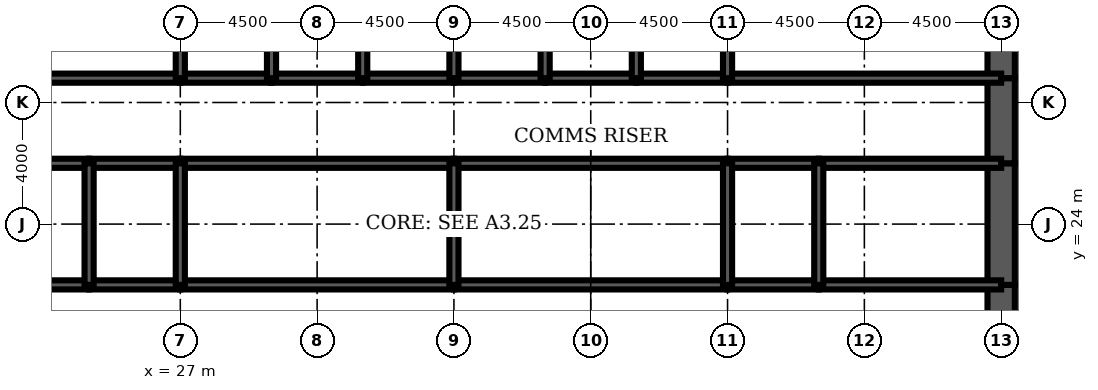
"""IFC4 building model, lengths in metres.
Left out: names, types, materials, properties, quantities, classifications, styles, units other than length and angle.
Written with IfcOpenShell. Run it as: python <this file> out.ifc"""

import sys

from ifc_helpers import new_model, si_unit, direction, frame, frame_2d, origin, place, context, subcontext, project, spatial, rectangle, extrude, element, fill, save


model = new_model("IFC4")
c1 = context("Model", 3, precision=1e-05, world=origin(), true_north=direction((0.0, 1.0)))
c2 = subcontext(c1, "Body", "Model", "MODEL_VIEW")
j1 = project(units=[si_unit("LENGTHUNIT", "METRE"), si_unit("PLANEANGLEUNIT", "RADIAN")], contexts=[c1])
p1 = place(None, origin())
s1 = spatial("IfcSite", under=j1, at=p1, CompositionType="ELEMENT")
p2 = place(p1, origin())
s2 = spatial("IfcBuilding", under=s1, at=p2, CompositionType="ELEMENT")
p3 = place(p2, frame((0.0, 0.0, 108.9)))
s3 = spatial("IfcBuildingStorey", under=s2, at=p3, CompositionType="ELEMENT", Elevation=108.9)
p4 = place(p3, frame((54.0, 19.2, 0.0), z_axis=(0.0, 0.0, 1.0), x_axis=(0.0, 1.0, 0.0)))
e1 = element("IfcWall", 1, at=p4, inside=s3, PredefinedType="SHEAR", context=c2, shape_type="SweptSolid", body=[
    extrude(rectangle(XDim=2.8, YDim=0.9, at=frame_2d((1.4, 0.0))), origin(), (0.0, 0.0, 1.0), 4.2),
])
p5 = place(p4, frame((0.4, 0.0, 0.0)))
e2 = element("IfcOpeningElement", 2, at=p5, cuts=e1, PredefinedType="OPENING", context=c2, shape_type="SweptSolid", body=[
    extrude(rectangle(XDim=1.8, YDim=2.1, at=frame_2d((0.9, 1.05))), frame((0.0, 0.46, 0.0), z_axis=(0.0, -1.0, 0.0), x_axis=(1.0, 0.0, 0.0)), (0.0, 0.0, 1.0), 0.92),
])
p6 = place(p3, frame((54.0, 22.0, 0.0), z_axis=(0.0, 0.0, 1.0), x_axis=(0.0, 1.0, 0.0)))
e3 = element("IfcWall", 3, at=p6, inside=s3, PredefinedType="SHEAR", context=c2, shape_type="SweptSolid", body=[
    extrude(rectangle(XDim=4.0, YDim=0.9, at=frame_2d((2.0, 0.0))), origin(), (0.0, 0.0, 1.0), 4.2),
])
p7 = place(p3, frame((54.0, 26.0, 0.0), z_axis=(0.0, 0.0, 1.0), x_axis=(0.0, 1.0, 0.0)))
e4 = element("IfcWall", 4, at=p7, inside=s3, PredefinedType="SHEAR", context=c2, shape_type="SweptSolid", body=[
    extrude(rectangle(XDim=2.8, YDim=0.9, at=frame_2d((1.4, 0.0))), origin(), (0.0, 0.0, 1.0), 4.2),
])
p8 = place(p7, frame((0.6, 0.0, 0.0)))
e5 = element("IfcOpeningElement", 5, at=p8, cuts=e4, PredefinedType="OPENING", context=c2, shape_type="SweptSolid", body=[
    extrude(rectangle(XDim=1.8, YDim=2.1, at=frame_2d((0.9, 1.05))), frame((0.0, 0.46, 0.0), z_axis=(0.0, -1.0, 0.0), x_axis=(1.0, 0.0, 0.0)), (0.0, 0.0, 1.0), 0.92),
])
p9 = place(p3, frame((54.0, 28.8, 0.0), z_axis=(0.0, 0.0, 1.0), x_axis=(0.0, 1.0, 0.0)))
e6 = element("IfcWall", 6, at=p9, inside=s3, PredefinedType="SHEAR", context=c2, shape_type="SweptSolid", body=[
    extrude(rectangle(XDim=3.2, YDim=0.9, at=frame_2d((1.6, 0.0))), origin(), (0.0, 0.0, 1.0), 4.2),
])
p10 = place(p3, frame((18.0, 28.8, 0.0), z_axis=(0.0, 0.0, 1.0), x_axis=(1.0, 0.0, 0.0)))
e7 = element("IfcWall", 7, at=p10, inside=s3, PredefinedType="SOLIDWALL", context=c2, shape_type="SweptSolid", body=[
    extrude(rectangle(XDim=9.0, YDim=0.3, at=frame_2d((4.5, 0.0))), origin(), (0.0, 0.0, 1.0), 4.2),
])
p11 = place(p10, frame((0.65, 0.0, 0.0)))
e8 = element("IfcOpeningElement", 8, at=p11, cuts=e7, PredefinedType="OPENING", context=c2, shape_type="SweptSolid", body=[
    extrude(rectangle(XDim=1.0, YDim=2.1, at=frame_2d((0.5, 1.05))), frame((0.0, 0.16, 0.0), z_axis=(0.0, -1.0, 0.0), x_axis=(1.0, 0.0, 0.0)), (0.0, 0.0, 1.0), 0.32),
])
p12 = place(p3, frame((27.0, 28.8, 0.0), z_axis=(0.0, 0.0, 1.0), x_axis=(1.0, 0.0, 0.0)))
e9 = element("IfcWall", 9, at=p12, inside=s3, PredefinedType="SOLIDWALL", context=c2, shape_type="SweptSolid", body=[
    extrude(rectangle(XDim=3.0, YDim=0.3, at=frame_2d((1.5, 0.0))), origin(), (0.0, 0.0, 1.0), 4.2),
])
p13 = place(p12, frame((0.95, 0.0, 0.0)))
e10 = element("IfcOpeningElement", 10, at=p13, cuts=e9, PredefinedType="OPENING", context=c2, shape_type="SweptSolid", body=[
    extrude(rectangle(XDim=1.1, YDim=2.2, at=frame_2d((0.55, 1.1))), frame((0.0, 0.16, 0.0), z_axis=(0.0, -1.0, 0.0), x_axis=(1.0, 0.0, 0.0)), (0.0, 0.0, 1.0), 0.32),
])
p14 = place(p3, frame((30.0, 28.8, 0.0), z_axis=(0.0, 0.0, 1.0), x_axis=(1.0, 0.0, 0.0)))
e11 = element("IfcWall", 11, at=p14, inside=s3, PredefinedType="SOLIDWALL", context=c2, shape_type="SweptSolid", body=[
    extrude(rectangle(XDim=3.0, YDim=0.3, at=frame_2d((1.5, 0.0))), origin(), (0.0, 0.0, 1.0), 4.2),
])
p15 = place(p14, frame((0.95, 0.0, 0.0)))
e12 = element("IfcOpeningElement", 12, at=p15, cuts=e11, PredefinedType="OPENING", context=c2, shape_type="SweptSolid", body=[
    extrude(rectangle(XDim=1.1, YDim=2.2, at=frame_2d((0.55, 1.1))), frame((0.0, 0.16, 0.0), z_axis=(0.0, -1.0, 0.0), x_axis=(1.0, 0.0, 0.0)), (0.0, 0.0, 1.0), 0.32),
])
p16 = place(p3, frame((33.0, 28.8, 0.0), z_axis=(0.0, 0.0, 1.0), x_axis=(1.0, 0.0, 0.0)))
e13 = element("IfcWall", 13, at=p16, inside=s3, PredefinedType="SOLIDWALL", context=c2, shape_type="SweptSolid", body=[
    extrude(rectangle(XDim=3.0, YDim=0.3, at=frame_2d((1.5, 0.0))), origin(), (0.0, 0.0, 1.0), 4.2),
])
p17 = place(p16, frame((0.95, 0.0, 0.0)))
e14 = element("IfcOpeningElement", 14, at=p17, cuts=e13, PredefinedType="OPENING", context=c2, shape_type="SweptSolid", body=[
    extrude(rectangle(XDim=1.1, YDim=2.2, at=frame_2d((0.55, 1.1))), frame((0.0, 0.16, 0.0), z_axis=(0.0, -1.0, 0.0), x_axis=(1.0, 0.0, 0.0)), (0.0, 0.0, 1.0), 0.32),
])
for number, where, z_axis, x_axis in (
    (15, (36.0, 28.8, 0.0), (0.0, 0.0, 1.0), (1.0, 0.0, 0.0)),
    (16, (39.0, 28.8, 0.0), (0.0, 0.0, 1.0), (1.0, 0.0, 0.0)),
):
    element("IfcWall", number, at=place(p3, frame(where, z_axis=z_axis, x_axis=x_axis)), inside=s3, PredefinedType="SOLIDWALL", context=c2, shape_type="SweptSolid", body=[
        extrude(rectangle(XDim=3.0, YDim=0.3, at=frame_2d((1.5, 0.0))), origin(), (0.0, 0.0, 1.0), 4.2),
    ])
p18 = place(p3, frame((42.0, 28.8, 0.0), z_axis=(0.0, 0.0, 1.0), x_axis=(1.0, 0.0, 0.0)))
e17 = element("IfcWall", 17, at=p18, inside=s3, PredefinedType="SOLIDWALL", context=c2, shape_type="SweptSolid", body=[
    extrude(rectangle(XDim=3.0, YDim=0.3, at=frame_2d((1.5, 0.0))), origin(), (0.0, 0.0, 1.0), 4.2),
])
p19 = place(p18, frame((0.95, 0.0, 0.0)))
e18 = element("IfcOpeningElement", 18, at=p19, cuts=e17, PredefinedType="OPENING", context=c2, shape_type="SweptSolid", body=[
    extrude(rectangle(XDim=1.1, YDim=2.2, at=frame_2d((0.55, 1.1))), frame((0.0, 0.16, 0.0), z_axis=(0.0, -1.0, 0.0), x_axis=(1.0, 0.0, 0.0)), (0.0, 0.0, 1.0), 0.32),
])
p20 = place(p3, frame((45.0, 28.8, 0.0), z_axis=(0.0, 0.0, 1.0), x_axis=(1.0, 0.0, 0.0)))
e19 = element("IfcWall", 19, at=p20, inside=s3, PredefinedType="SOLIDWALL", context=c2, shape_type="SweptSolid", body=[
    extrude(rectangle(XDim=9.0, YDim=0.3, at=frame_2d((4.5, 0.0))), origin(), (0.0, 0.0, 1.0), 4.2),
])
p21 = place(p20, frame((7.35, 0.0, 0.0)))
e20 = element("IfcOpeningElement", 20, at=p21, cuts=e19, PredefinedType="OPENING", context=c2, shape_type="SweptSolid", body=[
    extrude(rectangle(XDim=1.0, YDim=2.1, at=frame_2d((0.5, 1.05))), frame((0.0, 0.16, 0.0), z_axis=(0.0, -1.0, 0.0), x_axis=(1.0, 0.0, 0.0)), (0.0, 0.0, 1.0), 0.32),
])
p22 = place(p3, frame((18.0, 22.0, 0.0), z_axis=(0.0, 0.0, 1.0), x_axis=(1.0, 0.0, 0.0)))
e21 = element("IfcWall", 21, at=p22, inside=s3, PredefinedType="SOLIDWALL", context=c2, shape_type="SweptSolid", body=[
    extrude(rectangle(XDim=6.0, YDim=0.3, at=frame_2d((3.0, 0.0))), origin(), (0.0, 0.0, 1.0), 4.2),
])
p23 = place(p22, frame((4.4, 0.0, 0.0)))
e22 = element("IfcOpeningElement", 22, at=p23, cuts=e21, PredefinedType="OPENING", context=c2, shape_type="SweptSolid", body=[
    extrude(rectangle(XDim=1.0, YDim=2.1, at=frame_2d((0.5, 1.05))), frame((0.0, 0.16, 0.0), z_axis=(0.0, -1.0, 0.0), x_axis=(1.0, 0.0, 0.0)), (0.0, 0.0, 1.0), 0.32),
])
p24 = place(p22, frame((0.85, 0.0, 0.0)))
e23 = element("IfcOpeningElement", 23, at=p24, cuts=e21, PredefinedType="OPENING", context=c2, shape_type="SweptSolid", body=[
    extrude(rectangle(XDim=1.0, YDim=2.1, at=frame_2d((0.5, 1.05))), frame((0.0, 0.16, 0.0), z_axis=(0.0, -1.0, 0.0), x_axis=(1.0, 0.0, 0.0)), (0.0, 0.0, 1.0), 0.32),
])
p25 = place(p3, frame((24.0, 22.0, 0.0), z_axis=(0.0, 0.0, 1.0), x_axis=(1.0, 0.0, 0.0)))
e24 = element("IfcWall", 24, at=p25, inside=s3, PredefinedType="SOLIDWALL", context=c2, shape_type="SweptSolid", body=[
    extrude(rectangle(XDim=3.0, YDim=0.3, at=frame_2d((1.5, 0.0))), origin(), (0.0, 0.0, 1.0), 4.2),
])
p26 = place(p25, frame((1.0, 0.0, 0.0)))
e25 = element("IfcOpeningElement", 25, at=p26, cuts=e24, PredefinedType="OPENING", context=c2, shape_type="SweptSolid", body=[
    extrude(rectangle(XDim=1.0, YDim=2.1, at=frame_2d((0.5, 1.05))), frame((0.0, 0.16, 0.0), z_axis=(0.0, -1.0, 0.0), x_axis=(1.0, 0.0, 0.0)), (0.0, 0.0, 1.0), 0.32),
])
p27 = place(p3, frame((27.0, 22.0, 0.0), z_axis=(0.0, 0.0, 1.0), x_axis=(1.0, 0.0, 0.0)))
e26 = element("IfcWall", 26, at=p27, inside=s3, PredefinedType="SOLIDWALL", context=c2, shape_type="SweptSolid", body=[
    extrude(rectangle(XDim=9.0, YDim=0.3, at=frame_2d((4.5, 0.0))), origin(), (0.0, 0.0, 1.0), 4.2),
])
p28 = place(p27, frame((4.0, 0.0, 0.0)))
e27 = element("IfcOpeningElement", 27, at=p28, cuts=e26, PredefinedType="OPENING", context=c2, shape_type="SweptSolid", body=[
    extrude(rectangle(XDim=1.0, YDim=2.1, at=frame_2d((0.5, 1.05))), frame((0.0, 0.16, 0.0), z_axis=(0.0, -1.0, 0.0), x_axis=(1.0, 0.0, 0.0)), (0.0, 0.0, 1.0), 0.32),
])
p29 = place(p3, frame((36.0, 22.0, 0.0), z_axis=(0.0, 0.0, 1.0), x_axis=(1.0, 0.0, 0.0)))
e28 = element("IfcWall", 28, at=p29, inside=s3, PredefinedType="SOLIDWALL", context=c2, shape_type="SweptSolid", body=[
    extrude(rectangle(XDim=9.0, YDim=0.3, at=frame_2d((4.5, 0.0))), origin(), (0.0, 0.0, 1.0), 4.2),
])
p30 = place(p29, frame((4.0, 0.0, 0.0)))
e29 = element("IfcOpeningElement", 29, at=p30, cuts=e28, PredefinedType="OPENING", context=c2, shape_type="SweptSolid", body=[
    extrude(rectangle(XDim=1.0, YDim=2.1, at=frame_2d((0.5, 1.05))), frame((0.0, 0.16, 0.0), z_axis=(0.0, -1.0, 0.0), x_axis=(1.0, 0.0, 0.0)), (0.0, 0.0, 1.0), 0.32),
])
p31 = place(p3, frame((45.0, 22.0, 0.0), z_axis=(0.0, 0.0, 1.0), x_axis=(1.0, 0.0, 0.0)))
e30 = element("IfcWall", 30, at=p31, inside=s3, PredefinedType="SOLIDWALL", context=c2, shape_type="SweptSolid", body=[
    extrude(rectangle(XDim=3.0, YDim=0.3, at=frame_2d((1.5, 0.0))), origin(), (0.0, 0.0, 1.0), 4.2),
])
p32 = place(p31, frame((1.0, 0.0, 0.0)))
e31 = element("IfcOpeningElement", 31, at=p32, cuts=e30, PredefinedType="OPENING", context=c2, shape_type="SweptSolid", body=[
    extrude(rectangle(XDim=1.0, YDim=2.1, at=frame_2d((0.5, 1.05))), frame((0.0, 0.16, 0.0), z_axis=(0.0, -1.0, 0.0), x_axis=(1.0, 0.0, 0.0)), (0.0, 0.0, 1.0), 0.32),
])
p33 = place(p3, frame((48.0, 22.0, 0.0), z_axis=(0.0, 0.0, 1.0), x_axis=(1.0, 0.0, 0.0)))
e32 = element("IfcWall", 32, at=p33, inside=s3, PredefinedType="SOLIDWALL", context=c2, shape_type="SweptSolid", body=[
    extrude(rectangle(XDim=6.0, YDim=0.3, at=frame_2d((3.0, 0.0))), origin(), (0.0, 0.0, 1.0), 4.2),
])
p34 = place(p33, frame((2.0, 0.0, 0.0)))
e33 = element("IfcOpeningElement", 33, at=p34, cuts=e32, PredefinedType="OPENING", context=c2, shape_type="SweptSolid", body=[
    extrude(rectangle(XDim=1.0, YDim=2.1, at=frame_2d((0.5, 1.05))), frame((0.0, 0.16, 0.0), z_axis=(0.0, -1.0, 0.0), x_axis=(1.0, 0.0, 0.0)), (0.0, 0.0, 1.0), 0.32),
])
p35 = place(p33, frame((4.15, 0.0, 0.0)))
e34 = element("IfcOpeningElement", 34, at=p35, cuts=e32, PredefinedType="OPENING", context=c2, shape_type="SweptSolid", body=[
    extrude(rectangle(XDim=1.0, YDim=2.1, at=frame_2d((0.5, 1.05))), frame((0.0, 0.16, 0.0), z_axis=(0.0, -1.0, 0.0), x_axis=(1.0, 0.0, 0.0)), (0.0, 0.0, 1.0), 0.32),
])
p36 = place(p3, frame((18.0, 26.0, 0.0), z_axis=(0.0, 0.0, 1.0), x_axis=(1.0, 0.0, 0.0)))
e35 = element("IfcWall", 35, at=p36, inside=s3, PredefinedType="SOLIDWALL", context=c2, shape_type="SweptSolid", body=[
    extrude(rectangle(XDim=6.0, YDim=0.3, at=frame_2d((3.0, 0.0))), origin(), (0.0, 0.0, 1.0), 4.2),
])
p37 = place(p3, frame((24.0, 26.0, 0.0), z_axis=(0.0, 0.0, 1.0), x_axis=(1.0, 0.0, 0.0)))
e36 = element("IfcWall", 36, at=p37, inside=s3, PredefinedType="SOLIDWALL", context=c2, shape_type="SweptSolid", body=[
    extrude(rectangle(XDim=3.0, YDim=0.3, at=frame_2d((1.5, 0.0))), origin(), (0.0, 0.0, 1.0), 4.2),
])
for number, where, z_axis, x_axis in (
    (37, (27.0, 26.0, 0.0), (0.0, 0.0, 1.0), (1.0, 0.0, 0.0)),
    (38, (36.0, 26.0, 0.0), (0.0, 0.0, 1.0), (1.0, 0.0, 0.0)),
):
    element("IfcWall", number, at=place(p3, frame(where, z_axis=z_axis, x_axis=x_axis)), inside=s3, PredefinedType="SOLIDWALL", context=c2, shape_type="SweptSolid", body=[
        extrude(rectangle(XDim=9.0, YDim=0.3, at=frame_2d((4.5, 0.0))), origin(), (0.0, 0.0, 1.0), 4.2),
    ])
p38 = place(p3, frame((45.0, 26.0, 0.0), z_axis=(0.0, 0.0, 1.0), x_axis=(1.0, 0.0, 0.0)))
e39 = element("IfcWall", 39, at=p38, inside=s3, PredefinedType="SOLIDWALL", context=c2, shape_type="SweptSolid", body=[
    extrude(rectangle(XDim=3.0, YDim=0.3, at=frame_2d((1.5, 0.0))), origin(), (0.0, 0.0, 1.0), 4.2),
])
p39 = place(p3, frame((48.0, 26.0, 0.0), z_axis=(0.0, 0.0, 1.0), x_axis=(1.0, 0.0, 0.0)))
e40 = element("IfcWall", 40, at=p39, inside=s3, PredefinedType="SOLIDWALL", context=c2, shape_type="SweptSolid", body=[
    extrude(rectangle(XDim=6.0, YDim=0.3, at=frame_2d((3.0, 0.0))), origin(), (0.0, 0.0, 1.0), 4.2),
])
for number, where, z_axis, x_axis in (
    (41, (27.0, 28.8, 0.0), (0.0, 0.0, 1.0), (0.0, 1.0, 0.0)),
    (42, (30.0, 28.8, 0.0), (0.0, 0.0, 1.0), (0.0, 1.0, 0.0)),
    (43, (33.0, 28.8, 0.0), (0.0, 0.0, 1.0), (0.0, 1.0, 0.0)),
    (44, (36.0, 28.8, 0.0), (0.0, 0.0, 1.0), (0.0, 1.0, 0.0)),
    (45, (39.0, 28.8, 0.0), (0.0, 0.0, 1.0), (0.0, 1.0, 0.0)),
    (46, (42.0, 28.8, 0.0), (0.0, 0.0, 1.0), (0.0, 1.0, 0.0)),
    (47, (45.0, 28.8, 0.0), (0.0, 0.0, 1.0), (0.0, 1.0, 0.0)),
):
    element("IfcWall", number, at=place(p3, frame(where, z_axis=z_axis, x_axis=x_axis)), inside=s3, PredefinedType="SOLIDWALL", context=c2, shape_type="SweptSolid", body=[
        extrude(rectangle(XDim=3.2, YDim=0.3, at=frame_2d((1.6, 0.0))), origin(), (0.0, 0.0, 1.0), 4.2),
    ])
for number, where, z_axis, x_axis in (
    (48, (24.0, 22.0, 0.0), (0.0, 0.0, 1.0), (0.0, 1.0, 0.0)),
    (49, (27.0, 22.0, 0.0), (0.0, 0.0, 1.0), (0.0, 1.0, 0.0)),
    (50, (36.0, 22.0, 0.0), (0.0, 0.0, 1.0), (0.0, 1.0, 0.0)),
    (51, (45.0, 22.0, 0.0), (0.0, 0.0, 1.0), (0.0, 1.0, 0.0)),
    (52, (48.0, 22.0, 0.0), (0.0, 0.0, 1.0), (0.0, 1.0, 0.0)),
):
    element("IfcWall", number, at=place(p3, frame(where, z_axis=z_axis, x_axis=x_axis)), inside=s3, PredefinedType="SOLIDWALL", context=c2, shape_type="SweptSolid", body=[
        extrude(rectangle(XDim=4.0, YDim=0.3, at=frame_2d((2.0, 0.0))), origin(), (0.0, 0.0, 1.0), 4.2),
    ])
p40 = place(p3, frame((51.675, 22.15, 0.0), z_axis=(0.0, 0.0, 1.0), x_axis=(0.0, 1.0, 0.0)))
e53 = element("IfcWall", 53, at=p40, inside=s3, PredefinedType="PARTITIONING", context=c2, shape_type="SweptSolid", body=[
    extrude(rectangle(XDim=3.7, YDim=0.15, at=frame_2d((1.85, 0.0))), origin(), (0.0, 0.0, 1.0), 3.0),
])
p41 = place(p3, frame((23.7, 26.15, 0.0), z_axis=(0.0, 0.0, 1.0), x_axis=(0.0, 1.0, 0.0)))
e54 = element("IfcWall", 54, at=p41, inside=s3, PredefinedType="PARTITIONING", context=c2, shape_type="SweptSolid", body=[
    extrude(rectangle(XDim=2.5, YDim=0.15, at=frame_2d((1.25, 0.0))), origin(), (0.0, 0.0, 1.0), 3.0),
])
p42 = place(p41, frame((0.35, 0.0, 0.0)))
e55 = element("IfcOpeningElement", 55, at=p42, cuts=e54, PredefinedType="OPENING", context=c2, shape_type="SweptSolid", body=[
    extrude(rectangle(XDim=1.0, YDim=2.1, at=frame_2d((0.5, 1.05))), frame((0.0, 0.085, 0.0), z_axis=(0.0, -1.0, 0.0), x_axis=(1.0, 0.0, 0.0)), (0.0, 0.0, 1.0), 0.17),
])
p43 = place(p42, origin())
e56 = element("IfcDoor", 56, at=p43, inside=s3, OperationType="SINGLE_SWING_LEFT", PredefinedType="DOOR", context=c2, shape_type="SweptSolid", body=[
    extrude(rectangle(XDim=1.0, YDim=2.1, at=frame_2d((0.5, 1.05))), frame((0.0, 0.025, 0.0), z_axis=(0.0, -1.0, 0.0), x_axis=(1.0, 0.0, 0.0)), (0.0, 0.0, 1.0), 0.05),
])
fill(e55, e56)
p44 = place(p19, origin())
e57 = element("IfcDoor", 57, at=p44, inside=s3, OperationType="DOUBLE_DOOR_SLIDING", PredefinedType="USERDEFINED", context=c2, shape_type="SweptSolid", body=[
    extrude(rectangle(XDim=1.1, YDim=2.2, at=frame_2d((0.55, 1.1))), frame((0.0, 0.025, 0.0), z_axis=(0.0, -1.0, 0.0), x_axis=(1.0, 0.0, 0.0)), (0.0, 0.0, 1.0), 0.05),
])
fill(e18, e57)
p45 = place(p13, origin())
e58 = element("IfcDoor", 58, at=p45, inside=s3, OperationType="DOUBLE_DOOR_SLIDING", PredefinedType="USERDEFINED", context=c2, shape_type="SweptSolid", body=[
    extrude(rectangle(XDim=1.1, YDim=2.2, at=frame_2d((0.55, 1.1))), frame((0.0, 0.025, 0.0), z_axis=(0.0, -1.0, 0.0), x_axis=(1.0, 0.0, 0.0)), (0.0, 0.0, 1.0), 0.05),
])
fill(e10, e58)
p46 = place(p15, origin())
e59 = element("IfcDoor", 59, at=p46, inside=s3, OperationType="DOUBLE_DOOR_SLIDING", PredefinedType="USERDEFINED", context=c2, shape_type="SweptSolid", body=[
    extrude(rectangle(XDim=1.1, YDim=2.2, at=frame_2d((0.55, 1.1))), frame((0.0, 0.025, 0.0), z_axis=(0.0, -1.0, 0.0), x_axis=(1.0, 0.0, 0.0)), (0.0, 0.0, 1.0), 0.05),
])
fill(e12, e59)
p47 = place(p17, origin())
e60 = element("IfcDoor", 60, at=p47, inside=s3, OperationType="DOUBLE_DOOR_SLIDING", PredefinedType="USERDEFINED", context=c2, shape_type="SweptSolid", body=[
    extrude(rectangle(XDim=1.1, YDim=2.2, at=frame_2d((0.55, 1.1))), frame((0.0, 0.025, 0.0), z_axis=(0.0, -1.0, 0.0), x_axis=(1.0, 0.0, 0.0)), (0.0, 0.0, 1.0), 0.05),
])
fill(e14, e60)
p48 = place(p21, origin())
e61 = element("IfcDoor", 61, at=p48, inside=s3, OperationType="SINGLE_SWING_RIGHT", PredefinedType="DOOR", context=c2, shape_type="SweptSolid", body=[
    extrude(rectangle(XDim=1.0, YDim=2.1, at=frame_2d((0.5, 1.05))), frame((0.0, 0.025, 0.0), z_axis=(0.0, -1.0, 0.0), x_axis=(1.0, 0.0, 0.0)), (0.0, 0.0, 1.0), 0.05),
])
fill(e20, e61)
p49 = place(p5, origin())
e62 = element("IfcDoor", 62, at=p49, inside=s3, OperationType="SINGLE_SWING_LEFT", PredefinedType="DOOR", context=c2, shape_type="SweptSolid", body=[
    extrude(rectangle(XDim=1.8, YDim=2.1, at=frame_2d((0.9, 1.05))), frame((0.0, 0.45, 0.0), z_axis=(0.0, -1.0, 0.0), x_axis=(1.0, 0.0, 0.0)), (0.0, 0.0, 1.0), 0.899),
])
fill(e2, e62)
p50 = place(p8, origin())
e63 = element("IfcDoor", 63, at=p50, inside=s3, OperationType="SINGLE_SWING_LEFT", PredefinedType="DOOR", context=c2, shape_type="SweptSolid", body=[
    extrude(rectangle(XDim=1.8, YDim=2.1, at=frame_2d((0.9, 1.05))), frame((0.0, 0.45, 0.0), z_axis=(0.0, -1.0, 0.0), x_axis=(1.0, 0.0, 0.0)), (0.0, 0.0, 1.0), 0.899),
])
fill(e5, e63)
p51 = place(p23, origin())
e64 = element("IfcDoor", 64, at=p51, inside=s3, OperationType="SINGLE_SWING_RIGHT", PredefinedType="DOOR", context=c2, shape_type="SweptSolid", body=[
    extrude(rectangle(XDim=1.0, YDim=2.1, at=frame_2d((0.5, 1.05))), frame((0.0, 0.025, 0.0), z_axis=(0.0, -1.0, 0.0), x_axis=(1.0, 0.0, 0.0)), (0.0, 0.0, 1.0), 0.05),
])
fill(e22, e64)
p52 = place(p26, origin())
e65 = element("IfcDoor", 65, at=p52, inside=s3, OperationType="SINGLE_SWING_LEFT", PredefinedType="DOOR", context=c2, shape_type="SweptSolid", body=[
    extrude(rectangle(XDim=1.0, YDim=2.1, at=frame_2d((0.5, 1.05))), frame((0.0, 0.025, 0.0), z_axis=(0.0, -1.0, 0.0), x_axis=(1.0, 0.0, 0.0)), (0.0, 0.0, 1.0), 0.05),
])
fill(e25, e65)
p53 = place(p28, origin())
e66 = element("IfcDoor", 66, at=p53, inside=s3, OperationType="SINGLE_SWING_LEFT", PredefinedType="DOOR", context=c2, shape_type="SweptSolid", body=[
    extrude(rectangle(XDim=1.0, YDim=2.1, at=frame_2d((0.5, 1.05))), frame((0.0, 0.025, 0.0), z_axis=(0.0, -1.0, 0.0), x_axis=(1.0, 0.0, 0.0)), (0.0, 0.0, 1.0), 0.05),
])
fill(e27, e66)
p54 = place(p30, origin())
e67 = element("IfcDoor", 67, at=p54, inside=s3, OperationType="SINGLE_SWING_LEFT", PredefinedType="DOOR", context=c2, shape_type="SweptSolid", body=[
    extrude(rectangle(XDim=1.0, YDim=2.1, at=frame_2d((0.5, 1.05))), frame((0.0, 0.025, 0.0), z_axis=(0.0, -1.0, 0.0), x_axis=(1.0, 0.0, 0.0)), (0.0, 0.0, 1.0), 0.05),
])
fill(e29, e67)
p55 = place(p32, origin())
e68 = element("IfcDoor", 68, at=p55, inside=s3, OperationType="SINGLE_SWING_LEFT", PredefinedType="DOOR", context=c2, shape_type="SweptSolid", body=[
    extrude(rectangle(XDim=1.0, YDim=2.1, at=frame_2d((0.5, 1.05))), frame((0.0, 0.025, 0.0), z_axis=(0.0, -1.0, 0.0), x_axis=(1.0, 0.0, 0.0)), (0.0, 0.0, 1.0), 0.05),
])
fill(e31, e68)
p56 = place(p34, origin())
e69 = element("IfcDoor", 69, at=p56, inside=s3, OperationType="SINGLE_SWING_LEFT", PredefinedType="DOOR", context=c2, shape_type="SweptSolid", body=[
    extrude(rectangle(XDim=1.0, YDim=2.1, at=frame_2d((0.5, 1.05))), frame((0.0, 0.025, 0.0), z_axis=(0.0, -1.0, 0.0), x_axis=(1.0, 0.0, 0.0)), (0.0, 0.0, 1.0), 0.05),
])
fill(e33, e69)
p57 = place(p35, origin())
e70 = element("IfcDoor", 70, at=p57, inside=s3, OperationType="SINGLE_SWING_RIGHT", PredefinedType="DOOR", context=c2, shape_type="SweptSolid", body=[
    extrude(rectangle(XDim=1.0, YDim=2.1, at=frame_2d((0.5, 1.05))), frame((0.0, 0.025, 0.0), z_axis=(0.0, -1.0, 0.0), x_axis=(1.0, 0.0, 0.0)), (0.0, 0.0, 1.0), 0.05),
])
fill(e34, e70)
save(model, sys.argv[1])
